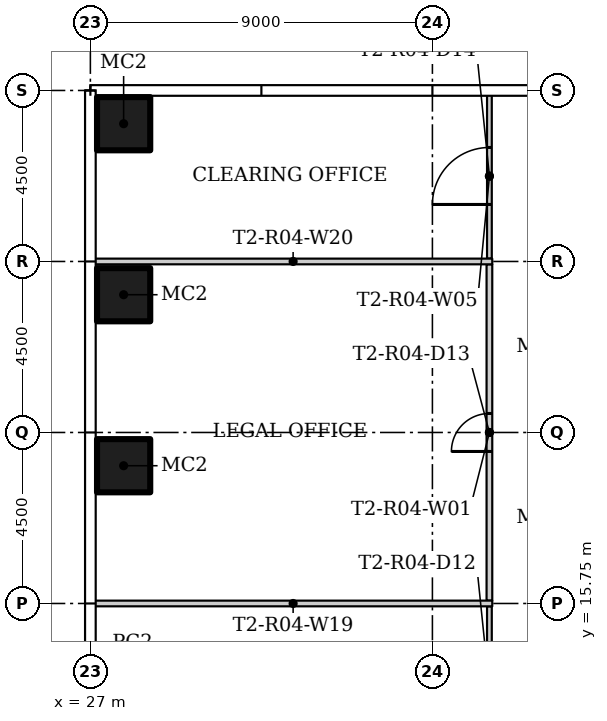
"""IFC4 building model, lengths in metres.
Left out: names, types, materials, properties, quantities, classifications, styles, units other than length and angle.
Written with IfcOpenShell. Run it as: python <this file> out.ifc"""

import sys

from ifc_helpers import new_model, si_unit, direction, frame, frame_2d, origin, origin_2d, place, context, subcontext, project, spatial, rectangle, hollow_rectangle, extrude, element, fill, save


model = new_model("IFC4")
c1 = context("Model", 3, precision=1e-05, world=origin(), true_north=direction((0.0, 1.0)))
c2 = subcontext(c1, "Body", "Model", "MODEL_VIEW")
j1 = project(units=[si_unit("LENGTHUNIT", "METRE"), si_unit("PLANEANGLEUNIT", "RADIAN")], contexts=[c1])
p1 = place(None, origin())
s1 = spatial("IfcSite", under=j1, at=p1, CompositionType="ELEMENT")
p2 = place(p1, origin())
s2 = spatial("IfcBuilding", under=s1, at=p2, CompositionType="ELEMENT")
p3 = place(p2, frame((0.0, 0.0, 53.7)))
s3 = spatial("IfcBuildingStorey", under=s2, at=p3, CompositionType="ELEMENT", Elevation=53.7)
for number, where in (
    (1, (27.875, 19.375, 0.0)),
    (2, (27.875, 23.875, 0.0)),
    (3, (27.875, 28.375, 0.0)),
):
    element("IfcColumn", number, at=place(p3, frame(where)), inside=s3, PredefinedType="COLUMN", context=c2, shape_type="SweptSolid", body=[
        extrude(hollow_rectangle(XDim=1.4, YDim=1.4, WallThickness=0.05, at=origin_2d()), origin(), (0.0, 0.0, 1.0), 3.55),
    ])
p4 = place(p3, frame((37.5, 15.825, 0.0), z_axis=(0.0, 0.0, 1.0), x_axis=(0.0, 1.0, 0.0)))
e4 = element("IfcWall", 4, at=p4, inside=s3, PredefinedType="PARTITIONING", context=c2, shape_type="SweptSolid", body=[
    extrude(rectangle(XDim=8.85, YDim=0.15, at=frame_2d((4.425, 0.0))), origin(), (0.0, 0.0, 1.0), 3.55),
])
p5 = place(p4, frame((3.925, 0.0, 0.0)))
e5 = element("IfcOpeningElement", 5, at=p5, cuts=e4, PredefinedType="OPENING", context=c2, shape_type="SweptSolid", body=[
    extrude(rectangle(XDim=1.0, YDim=2.4, at=frame_2d((0.5, 1.2))), frame((0.0, 0.085, 0.0), z_axis=(0.0, -1.0, 0.0), x_axis=(1.0, 0.0, 0.0)), (0.0, 0.0, 1.0), 0.17),
])
p6 = place(p3, frame((37.5, 24.825, 0.0), z_axis=(0.0, 0.0, 1.0), x_axis=(0.0, 1.0, 0.0)))
e6 = element("IfcWall", 6, at=p6, inside=s3, PredefinedType="PARTITIONING", context=c2, shape_type="SweptSolid", body=[
    extrude(rectangle(XDim=4.33, YDim=0.125, at=frame_2d((2.165, 0.0))), origin(), (0.0, 0.0, 1.0), 3.55),
])
p7 = place(p6, frame((1.425, 0.0, 0.0)))
e7 = element("IfcOpeningElement", 7, at=p7, cuts=e6, PredefinedType="OPENING", context=c2, shape_type="SweptSolid", body=[
    extrude(rectangle(XDim=1.5, YDim=2.1, at=frame_2d((0.75, 1.05))), frame((0.0, 0.073, 0.0), z_axis=(0.0, -1.0, 0.0), x_axis=(1.0, 0.0, 0.0)), (0.0, 0.0, 1.0), 0.145),
])
p8 = place(p3, frame((37.5, 11.325, 0.0), z_axis=(0.0, 0.0, 1.0), x_axis=(0.0, 1.0, 0.0)))
e8 = element("IfcWall", 8, at=p8, inside=s3, PredefinedType="PARTITIONING", context=c2, shape_type="SweptSolid", body=[
    extrude(rectangle(XDim=4.35, YDim=0.125, at=frame_2d((2.175, 0.0))), origin(), (0.0, 0.0, 1.0), 3.55),
])
p9 = place(p8, frame((1.425, 0.0, 0.0)))
e9 = element("IfcOpeningElement", 9, at=p9, cuts=e8, PredefinedType="OPENING", context=c2, shape_type="SweptSolid", body=[
    extrude(rectangle(XDim=1.5, YDim=2.1, at=frame_2d((0.75, 1.05))), frame((0.0, 0.073, 0.0), z_axis=(0.0, -1.0, 0.0), x_axis=(1.0, 0.0, 0.0)), (0.0, 0.0, 1.0), 0.145),
])
for number, where, z_axis, x_axis in (
    (10, (37.575, 15.75, 0.0), (0.0, 0.0, 1.0), (-1.0, 0.0, 0.0)),
    (11, (37.575, 24.75, 0.0), (0.0, 0.0, 1.0), (-1.0, 0.0, 0.0)),
):
    element("IfcWall", number, at=place(p3, frame(where, z_axis=z_axis, x_axis=x_axis)), inside=s3, PredefinedType="PARTITIONING", context=c2, shape_type="SweptSolid", body=[
        extrude(rectangle(XDim=10.48, YDim=0.15, at=frame_2d((5.24, 0.0))), origin(), (0.0, 0.0, 1.0), 3.55),
    ])
p10 = place(p5, origin())
e12 = element("IfcDoor", 12, at=p10, inside=s3, OperationType="SINGLE_SWING_RIGHT", PredefinedType="DOOR", context=c2, shape_type="SweptSolid", body=[
    extrude(rectangle(XDim=1.0, YDim=2.4, at=frame_2d((0.5, 1.2))), frame((0.0, 0.025, 0.0), z_axis=(0.0, -1.0, 0.0), x_axis=(1.0, 0.0, 0.0)), (0.0, 0.0, 1.0), 0.05),
])
fill(e5, e12)
p11 = place(p7, origin())
e13 = element("IfcDoor", 13, at=p11, inside=s3, OperationType="DOUBLE_DOOR_SINGLE_SWING", PredefinedType="DOOR", context=c2, shape_type="SweptSolid", body=[
    extrude(rectangle(XDim=1.5, YDim=2.1, at=frame_2d((0.75, 1.05))), frame((0.0, 0.025, 0.0), z_axis=(0.0, -1.0, 0.0), x_axis=(1.0, 0.0, 0.0)), (0.0, 0.0, 1.0), 0.05),
])
fill(e7, e13)
save(model, sys.argv[1])
